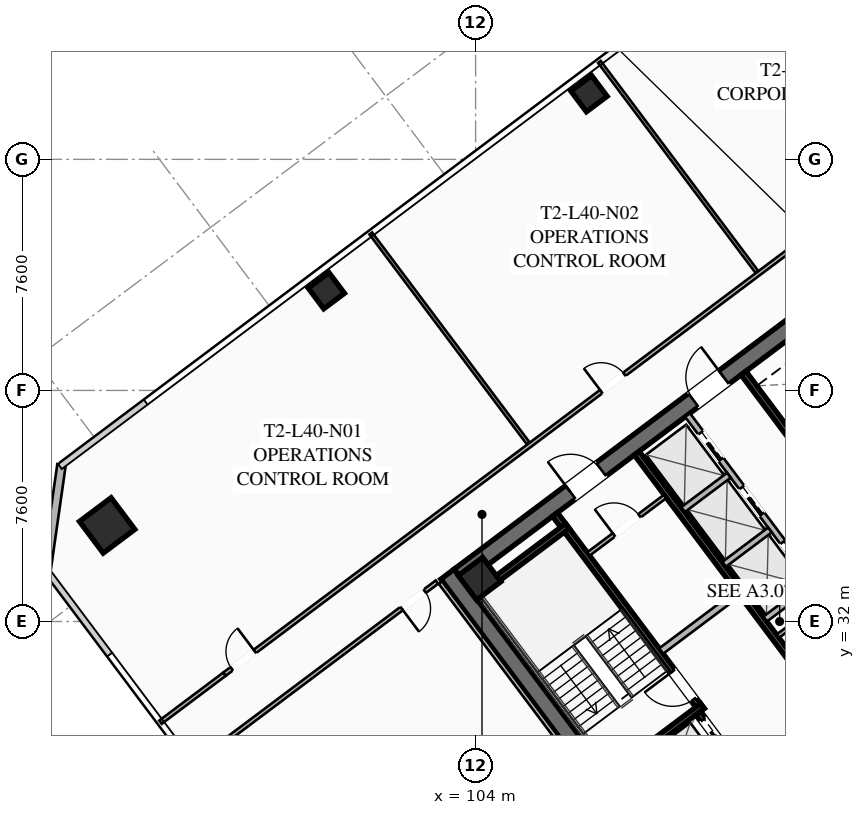
"""IFC4 building model, lengths in metres.
Left out: names, types, materials, properties, quantities, classifications, styles, units other than length and angle.
Written with IfcOpenShell. Run it as: python <this file> out.ifc"""

import sys

from ifc_helpers import new_model, si_unit, direction, frame, frame_2d, origin, origin_2d, place, context, subcontext, project, spatial, rectangle, hollow_rectangle, extrude, element, fill, save


model = new_model("IFC4")
c1 = context("Model", 3, precision=1e-05, world=origin(), true_north=direction((0.0, 1.0)))
c2 = subcontext(c1, "Body", "Model", "MODEL_VIEW")
j1 = project(units=[si_unit("LENGTHUNIT", "METRE"), si_unit("PLANEANGLEUNIT", "RADIAN")], contexts=[c1])
p1 = place(None, origin())
s1 = spatial("IfcSite", under=j1, at=p1, CompositionType="ELEMENT")
p2 = place(p1, origin())
s2 = spatial("IfcBuilding", under=s1, at=p2, CompositionType="ELEMENT")
p3 = place(p2, frame((0.0, 0.0, 149.9)))
s3 = spatial("IfcBuildingStorey", under=s2, at=p3, CompositionType="ELEMENT", Elevation=149.9)
p4 = place(p3, frame((112.436, 21.077, 0.0), z_axis=(0.0, 0.0, 1.0), x_axis=(-0.600005007985, 0.799996243986, 0.0)))
e1 = element("IfcWall", 1, at=p4, inside=s3, PredefinedType="SHEAR", context=c2, shape_type="SweptSolid", body=[
    extrude(rectangle(XDim=15.6, YDim=0.55, at=frame_2d((7.8, 0.0))), origin(), (0.0, 0.0, 1.0), 3.55),
])
p5 = place(p3, frame((124.539, 30.498, 0.0), z_axis=(0.0, 0.0, 1.0), x_axis=(-0.799998054672, -0.600002593761, 0.0)))
e2 = element("IfcWall", 2, at=p5, inside=s3, PredefinedType="SHEAR", context=c2, shape_type="SweptSolid", body=[
    extrude(rectangle(XDim=15.06, YDim=0.55, at=frame_2d((7.53, 0.0))), origin(), (0.0, 0.0, 1.0), 3.55),
])
p6 = place(p5, frame((9.23, 0.0, 0.0)))
e3 = element("IfcOpeningElement", 3, at=p6, cuts=e2, PredefinedType="OPENING", context=c2, shape_type="SweptSolid", body=[
    extrude(rectangle(XDim=1.25, YDim=2.25, at=frame_2d((0.625, 1.125))), frame((0.0, 0.285, 0.0), z_axis=(0.0, -1.0, 0.0), x_axis=(1.0, 0.0, 0.0)), (0.0, 0.0, 1.0), 0.57),
])
p7 = place(p5, frame((4.18, 0.0, 0.0)))
e4 = element("IfcOpeningElement", 4, at=p7, cuts=e2, PredefinedType="OPENING", context=c2, shape_type="SweptSolid", body=[
    extrude(rectangle(XDim=1.25, YDim=2.25, at=frame_2d((0.625, 1.125))), frame((0.0, 0.285, 0.0), z_axis=(0.0, -1.0, 0.0), x_axis=(1.0, 0.0, 0.0)), (0.0, 0.0, 1.0), 0.57),
])
p8 = place(p3, frame((103.461, 33.502, 0.0), z_axis=(0.0, 0.0, 1.0), x_axis=(0.799998054672, 0.600002593761, 0.0)))
e5 = element("IfcWall", 5, at=p8, inside=s3, PredefinedType="SHEAR", context=c2, shape_type="SweptSolid", body=[
    extrude(rectangle(XDim=15.06, YDim=0.55, at=frame_2d((7.53, 0.0))), origin(), (0.0, 0.0, 1.0), 3.55),
])
p9 = place(p8, frame((4.58, 0.0, 0.0)))
e6 = element("IfcOpeningElement", 6, at=p9, cuts=e5, PredefinedType="OPENING", context=c2, shape_type="SweptSolid", body=[
    extrude(rectangle(XDim=1.25, YDim=2.25, at=frame_2d((0.625, 1.125))), frame((0.0, 0.285, 0.0), z_axis=(0.0, -1.0, 0.0), x_axis=(1.0, 0.0, 0.0)), (0.0, 0.0, 1.0), 0.57),
])
p10 = place(p8, frame((9.63, 0.0, 0.0)))
e7 = element("IfcOpeningElement", 7, at=p10, cuts=e5, PredefinedType="OPENING", context=c2, shape_type="SweptSolid", body=[
    extrude(rectangle(XDim=1.25, YDim=2.25, at=frame_2d((0.625, 1.125))), frame((0.0, 0.285, 0.0), z_axis=(0.0, -1.0, 0.0), x_axis=(1.0, 0.0, 0.0)), (0.0, 0.0, 1.0), 0.57),
])
p11 = place(p3, frame((104.13, 33.41, 0.0), z_axis=(0.0, 0.0, 1.0), x_axis=(0.799999996291, 0.600000004945, 0.0)))
e8 = element("IfcColumn", 8, at=p11, inside=s3, PredefinedType="COLUMN", context=c2, shape_type="SweptSolid", body=[
    extrude(hollow_rectangle(XDim=1.0, YDim=1.0, WallThickness=0.04, at=origin_2d()), origin(), (0.0, 0.0, 1.0), 3.37),
])
p12 = place(p3, frame((91.88, 35.16, 0.0), z_axis=(0.0, 0.0, 1.0), x_axis=(0.799999996291, 0.600000004945, 0.0)))
e9 = element("IfcColumn", 9, at=p12, inside=s3, PredefinedType="COLUMN", context=c2, shape_type="SweptSolid", body=[
    extrude(hollow_rectangle(XDim=1.3, YDim=1.3, WallThickness=0.05, at=origin_2d()), origin(), (0.0, 0.0, 1.0), 3.37),
])
for number, where, z_axis, x_axis in (
    (10, (107.73, 49.36, 0.0), (0.0, 0.0, 1.0), (0.8, 0.6, 0.0)),
    (11, (99.09, 42.88, 0.0), (0.0, 0.0, 1.0), (0.8, 0.6, 0.0)),
):
    element("IfcColumn", number, at=place(p3, frame(where, z_axis=z_axis, x_axis=x_axis)), inside=s3, PredefinedType="COLUMN", context=c2, shape_type="SweptSolid", body=[
        extrude(hollow_rectangle(XDim=0.85, YDim=0.85, WallThickness=0.035, at=origin_2d()), origin(), (0.0, 0.0, 1.0), 3.37),
    ])
p13 = place(p3, frame((89.88, 33.66, 0.0), z_axis=(0.0, 0.0, 1.0), x_axis=(0.141421356237, 0.989949493661, 0.0)))
e12 = element("IfcWall", 12, at=p13, inside=s3, PredefinedType="SOLIDWALL", context=c2, shape_type="SweptSolid", body=[
    extrude(rectangle(XDim=3.536, YDim=0.28, at=frame_2d((1.768, 0.0))), origin(), (0.0, 0.0, 1.0), 3.37),
])
p14 = place(p3, frame((111.44, 29.08, 0.0), z_axis=(0.0, 0.0, 1.0), x_axis=(-0.59999029481, 0.8000072788, 0.0)))
e13 = element("IfcWall", 13, at=p14, inside=s3, PredefinedType="SHEAR", context=c2, shape_type="SweptSolid", body=[
    extrude(rectangle(XDim=8.05, YDim=0.2, at=frame_2d((4.025, 0.0))), origin(), (0.0, 0.0, 1.0), 3.37),
])
p15 = place(p14, frame((0.45, 0.0, 0.0)))
e14 = element("IfcOpeningElement", 14, at=p15, cuts=e13, PredefinedType="OPENING", context=c2, shape_type="SweptSolid", body=[
    extrude(rectangle(XDim=1.15, YDim=2.2, at=frame_2d((0.575, 1.1))), frame((0.0, 0.11, 0.0), z_axis=(0.0, -1.0, 0.0), x_axis=(1.0, 0.0, 0.0)), (0.0, 0.0, 1.0), 0.22),
])
for number, where, z_axis, x_axis in (
    (15, (108.396, 26.922, 0.0), (0.0, 0.0, 1.0), (0.8, 0.6, 0.0)),
    (16, (103.956, 32.842, 0.0), (0.0, 0.0, 1.0), (0.8, 0.6, 0.0)),
):
    element("IfcWall", number, at=place(p3, frame(where, z_axis=z_axis, x_axis=x_axis)), inside=s3, PredefinedType="SHEAR", context=c2, shape_type="SweptSolid", body=[
        extrude(rectangle(XDim=3.83, YDim=0.2, at=frame_2d((1.915, 0.0))), origin(), (0.0, 0.0, 1.0), 3.37),
    ])
p16 = place(p3, frame((117.998, 25.936, 0.0), z_axis=(0.0, 0.0, 1.0), x_axis=(-0.600002693989, 0.799997979501, 0.0)))
e17 = element("IfcWall", 17, at=p16, inside=s3, PredefinedType="SHEAR", context=c2, shape_type="SweptSolid", body=[
    extrude(rectangle(XDim=14.5, YDim=0.2, at=frame_2d((7.25, 0.0))), origin(), (0.0, 0.0, 1.0), 3.37),
])
p17 = place(p3, frame((110.104, 31.028, 0.0), z_axis=(0.0, 0.0, 1.0), x_axis=(0.800018601094, 0.59997519774, 0.0)))
e18 = element("IfcWall", 18, at=p17, inside=s3, PredefinedType="SOLIDWALL", context=c2, shape_type="SweptSolid", body=[
    extrude(rectangle(XDim=3.15, YDim=0.22, at=frame_2d((1.575, 0.0))), origin(), (0.0, 0.0, 1.0), 2.723),
])
p18 = place(p3, frame((115.19, 23.83, 0.0), z_axis=(0.0, 0.0, 1.0), x_axis=(-0.599993943644, 0.800004542231, 0.0)))
e19 = element("IfcWall", 19, at=p18, inside=s3, PredefinedType="SHEAR", context=c2, shape_type="SweptSolid", body=[
    extrude(rectangle(XDim=6.45, YDim=0.2, at=frame_2d((3.225, 0.0))), origin(), (0.0, 0.0, 1.0), 3.37),
])
p19 = place(p18, frame((4.875, 0.0, 0.0)))
e20 = element("IfcOpeningElement", 20, at=p19, cuts=e19, PredefinedType="OPENING", context=c2, shape_type="SweptSolid", body=[
    extrude(rectangle(XDim=1.3, YDim=2.25, at=frame_2d((0.65, 1.125))), frame((0.0, 0.11, 0.0), z_axis=(0.0, -1.0, 0.0), x_axis=(1.0, 0.0, 0.0)), (0.0, 0.0, 1.0), 0.22),
])
p20 = place(p18, frame((2.875, 0.0, 0.0)))
e21 = element("IfcOpeningElement", 21, at=p20, cuts=e19, PredefinedType="OPENING", context=c2, shape_type="SweptSolid", body=[
    extrude(rectangle(XDim=1.3, YDim=2.25, at=frame_2d((0.65, 1.125))), frame((0.0, 0.11, 0.0), z_axis=(0.0, -1.0, 0.0), x_axis=(1.0, 0.0, 0.0)), (0.0, 0.0, 1.0), 0.22),
])
p21 = place(p18, frame((0.675, 0.0, 0.0)))
e22 = element("IfcOpeningElement", 22, at=p21, cuts=e19, PredefinedType="OPENING", context=c2, shape_type="SweptSolid", body=[
    extrude(rectangle(XDim=1.3, YDim=2.25, at=frame_2d((0.65, 1.125))), frame((0.0, 0.11, 0.0), z_axis=(0.0, -1.0, 0.0), x_axis=(1.0, 0.0, 0.0)), (0.0, 0.0, 1.0), 0.22),
])
p22 = place(p3, frame((112.81, 40.17, 0.0), z_axis=(0.0, 0.0, 1.0), x_axis=(0.599993943644, -0.800004542231, 0.0)))
e23 = element("IfcWall", 23, at=p22, inside=s3, PredefinedType="SHEAR", context=c2, shape_type="SweptSolid", body=[
    extrude(rectangle(XDim=6.45, YDim=0.2, at=frame_2d((3.225, 0.0))), origin(), (0.0, 0.0, 1.0), 3.37),
])
p23 = place(p3, frame((107.71, 34.22, 0.0), z_axis=(0.0, 0.0, 1.0), x_axis=(0.799981399002, 0.60002480053, 0.0)))
e24 = element("IfcWall", 24, at=p23, inside=s3, PredefinedType="PARTITIONING", context=c2, shape_type="SweptSolid", body=[
    extrude(rectangle(XDim=3.15, YDim=0.135, at=frame_2d((1.575, 0.0))), origin(), (0.0, 0.0, 1.0), 2.723),
])
p24 = place(p23, frame((1.05, 0.0, 0.0)))
e25 = element("IfcOpeningElement", 25, at=p24, cuts=e24, PredefinedType="OPENING", context=c2, shape_type="SweptSolid", body=[
    extrude(rectangle(XDim=1.05, YDim=2.2, at=frame_2d((0.525, 1.1))), frame((0.0, 0.077, 0.0), z_axis=(0.0, -1.0, 0.0), x_axis=(1.0, 0.0, 0.0)), (0.0, 0.0, 1.0), 0.155),
])
p25 = place(p3, frame((113.946, 31.522, 0.0), z_axis=(0.0, 0.0, 1.0), x_axis=(0.8, 0.6, 0.0)))
e26 = element("IfcWall", 26, at=p25, inside=s3, PredefinedType="PARTITIONING", context=c2, shape_type="SweptSolid", body=[
    extrude(rectangle(XDim=1.88, YDim=0.135, at=frame_2d((0.94, 0.0))), origin(), (0.0, 0.0, 1.0), 2.723),
])
p26 = place(p3, frame((115.11, 33.27, 0.0), z_axis=(0.0, 0.0, 1.0), x_axis=(-0.600011322243, 0.799991508192, 0.0)))
e27 = element("IfcWall", 27, at=p26, inside=s3, PredefinedType="SOLIDWALL", context=c2, shape_type="SweptSolid", body=[
    extrude(rectangle(XDim=6.9, YDim=0.2, at=frame_2d((3.45, 0.0))), origin(), (0.0, 0.0, 1.0), 3.37),
])
p27 = place(p26, frame((0.575, 0.0, 0.0)))
e28 = element("IfcOpeningElement", 28, at=p27, cuts=e27, PredefinedType="OPENING", context=c2, shape_type="SweptSolid", body=[
    extrude(rectangle(XDim=1.1, YDim=2.2, at=frame_2d((0.55, 1.1))), frame((0.0, 0.11, 0.0), z_axis=(0.0, -1.0, 0.0), x_axis=(1.0, 0.0, 0.0)), (0.0, 0.0, 1.0), 0.22),
])
p28 = place(p26, frame((2.825, 0.0, 0.0)))
e29 = element("IfcOpeningElement", 29, at=p28, cuts=e27, PredefinedType="OPENING", context=c2, shape_type="SweptSolid", body=[
    extrude(rectangle(XDim=1.1, YDim=2.2, at=frame_2d((0.55, 1.1))), frame((0.0, 0.11, 0.0), z_axis=(0.0, -1.0, 0.0), x_axis=(1.0, 0.0, 0.0)), (0.0, 0.0, 1.0), 0.22),
])
p29 = place(p26, frame((5.075, 0.0, 0.0)))
e30 = element("IfcOpeningElement", 30, at=p29, cuts=e27, PredefinedType="OPENING", context=c2, shape_type="SweptSolid", body=[
    extrude(rectangle(XDim=1.1, YDim=2.2, at=frame_2d((0.55, 1.1))), frame((0.0, 0.11, 0.0), z_axis=(0.0, -1.0, 0.0), x_axis=(1.0, 0.0, 0.0)), (0.0, 0.0, 1.0), 0.22),
])
p30 = place(p3, frame((113.526, 32.082, 0.0), z_axis=(0.0, 0.0, 1.0), x_axis=(0.800046745961, 0.599937666993, 0.0)))
e31 = element("IfcWall", 31, at=p30, inside=s3, PredefinedType="SOLIDWALL", context=c2, shape_type="SweptSolid", body=[
    extrude(rectangle(XDim=1.88, YDim=0.2, at=frame_2d((0.94, 0.0))), origin(), (0.0, 0.0, 1.0), 3.37),
])
p31 = place(p3, frame((112.176, 33.882, 0.0), z_axis=(0.0, 0.0, 1.0), x_axis=(0.8, 0.6, 0.0)))
e32 = element("IfcWall", 32, at=p31, inside=s3, PredefinedType="SOLIDWALL", context=c2, shape_type="SweptSolid", body=[
    extrude(rectangle(XDim=1.88, YDim=0.2, at=frame_2d((0.94, 0.0))), origin(), (0.0, 0.0, 1.0), 3.37),
])
p32 = place(p3, frame((110.826, 35.682, 0.0), z_axis=(0.0, 0.0, 1.0), x_axis=(0.799984418148, 0.600020775241, 0.0)))
e33 = element("IfcWall", 33, at=p32, inside=s3, PredefinedType="SOLIDWALL", context=c2, shape_type="SweptSolid", body=[
    extrude(rectangle(XDim=1.88, YDim=0.2, at=frame_2d((0.94, 0.0))), origin(), (0.0, 0.0, 1.0), 3.37),
])
p33 = place(p3, frame((95.738, 30.266, 0.0), z_axis=(0.0, 0.0, 1.0), x_axis=(0.800003744006, 0.59999500796, 0.0)))
e34 = element("IfcWall", 34, at=p33, inside=s3, PredefinedType="PARTITIONING", context=c2, shape_type="SweptSolid", body=[
    extrude(rectangle(XDim=31.3, YDim=0.135, at=frame_2d((15.65, 0.0))), origin(), (0.0, 0.0, 1.0), 2.723),
])
p34 = place(p33, frame((0.3, 0.0, 0.0)))
e35 = element("IfcOpeningElement", 35, at=p34, cuts=e34, PredefinedType="OPENING", context=c2, shape_type="SweptSolid", body=[
    extrude(rectangle(XDim=0.95, YDim=2.05, at=frame_2d((0.475, 1.025))), frame((0.0, 0.077, 0.0), z_axis=(0.0, -1.0, 0.0), x_axis=(1.0, 0.0, 0.0)), (0.0, 0.0, 1.0), 0.155),
])
p35 = place(p33, frame((15.493, 0.0, 0.0)))
e36 = element("IfcOpeningElement", 36, at=p35, cuts=e34, PredefinedType="OPENING", context=c2, shape_type="SweptSolid", body=[
    extrude(rectangle(XDim=0.95, YDim=2.05, at=frame_2d((0.475, 1.025))), frame((0.0, 0.077, 0.0), z_axis=(0.0, -1.0, 0.0), x_axis=(1.0, 0.0, 0.0)), (0.0, 0.0, 1.0), 0.155),
])
p36 = place(p33, frame((30.05, 0.0, 0.0)))
e37 = element("IfcOpeningElement", 37, at=p36, cuts=e34, PredefinedType="OPENING", context=c2, shape_type="SweptSolid", body=[
    extrude(rectangle(XDim=0.95, YDim=2.05, at=frame_2d((0.475, 1.025))), frame((0.0, 0.077, 0.0), z_axis=(0.0, -1.0, 0.0), x_axis=(1.0, 0.0, 0.0)), (0.0, 0.0, 1.0), 0.155),
])
p37 = place(p3, frame((93.634, 28.688, 0.0), z_axis=(0.0, 0.0, 1.0), x_axis=(0.799977721118, 0.600029704027, 0.0)))
e38 = element("IfcWall", 38, at=p37, inside=s3, PredefinedType="PARTITIONING", context=c2, shape_type="SweptSolid", body=[
    extrude(rectangle(XDim=2.63, YDim=0.135, at=frame_2d((1.315, 0.0))), origin(), (0.0, 0.0, 1.0), 2.723),
])
p38 = place(p3, frame((105.73, 37.86, 0.0), z_axis=(0.0, 0.0, 1.0), x_axis=(-0.600009052859, 0.799993210276, 0.0)))
e39 = element("IfcWall", 39, at=p38, inside=s3, PredefinedType="PARTITIONING", context=c2, shape_type="SweptSolid", body=[
    extrude(rectangle(XDim=8.63, YDim=0.11, at=frame_2d((4.315, 0.0))), origin(), (0.0, 0.0, 1.0), 2.723),
])
p39 = place(p3, frame((113.25, 43.5, 0.0), z_axis=(0.0, 0.0, 1.0), x_axis=(-0.599995473644, 0.800003394747, 0.0)))
e40 = element("IfcWall", 40, at=p39, inside=s3, PredefinedType="PARTITIONING", context=c2, shape_type="SweptSolid", body=[
    extrude(rectangle(XDim=8.63, YDim=0.11, at=frame_2d((4.315, 0.0))), origin(), (0.0, 0.0, 1.0), 2.723),
])
p40 = place(p3, frame((133.09, 32.63, 0.0), z_axis=(0.0, 0.0, 1.0), x_axis=(-0.800003744006, -0.59999500796, 0.0)))
e41 = element("IfcWall", 41, at=p40, inside=s3, PredefinedType="PARTITIONING", context=c2, shape_type="SweptSolid", body=[
    extrude(rectangle(XDim=31.3, YDim=0.135, at=frame_2d((15.65, 0.0))), origin(), (0.0, 0.0, 1.0), 2.723),
])
p41 = place(p40, frame((29.97, 0.0, 0.0)))
e42 = element("IfcOpeningElement", 42, at=p41, cuts=e41, PredefinedType="OPENING", context=c2, shape_type="SweptSolid", body=[
    extrude(rectangle(XDim=0.95, YDim=2.05, at=frame_2d((0.475, 1.025))), frame((0.0, 0.077, 0.0), z_axis=(0.0, -1.0, 0.0), x_axis=(1.0, 0.0, 0.0)), (0.0, 0.0, 1.0), 0.155),
])
p42 = place(p40, frame((18.914, 0.0, 0.0)))
e43 = element("IfcOpeningElement", 43, at=p42, cuts=e41, PredefinedType="OPENING", context=c2, shape_type="SweptSolid", body=[
    extrude(rectangle(XDim=0.95, YDim=2.05, at=frame_2d((0.475, 1.025))), frame((0.0, 0.077, 0.0), z_axis=(0.0, -1.0, 0.0), x_axis=(1.0, 0.0, 0.0)), (0.0, 0.0, 1.0), 0.155),
])
p43 = place(p40, frame((0.38, 0.0, 0.0)))
e44 = element("IfcOpeningElement", 44, at=p43, cuts=e41, PredefinedType="OPENING", context=c2, shape_type="SweptSolid", body=[
    extrude(rectangle(XDim=0.95, YDim=2.05, at=frame_2d((0.475, 1.025))), frame((0.0, 0.077, 0.0), z_axis=(0.0, -1.0, 0.0), x_axis=(1.0, 0.0, 0.0)), (0.0, 0.0, 1.0), 0.155),
])
p44 = place(p3, frame((112.104, 20.928, 0.0), z_axis=(0.0, 0.0, 1.0), x_axis=(-0.599994940075, 0.800003794918, 0.0)))
e45 = element("IfcWall", 45, at=p44, inside=s3, PredefinedType="PARTITIONING", context=c2, shape_type="SweptSolid", body=[
    extrude(rectangle(XDim=15.44, YDim=0.135, at=frame_2d((7.72, 0.0))), origin(), (0.0, 0.0, 1.0), 2.723),
])
p45 = place(p3, frame((102.728, 33.296, 0.0), z_axis=(0.0, 0.0, 1.0), x_axis=(-0.800002918023, -0.599996109283, 0.0)))
e46 = element("IfcWall", 46, at=p45, inside=s3, PredefinedType="PARTITIONING", context=c2, shape_type="SweptSolid", body=[
    extrude(rectangle(XDim=10.04, YDim=0.135, at=frame_2d((5.02, 0.0))), origin(), (0.0, 0.0, 1.0), 2.723),
])
p46 = place(p45, frame((0.5, 0.0, 0.0)))
e47 = element("IfcOpeningElement", 47, at=p46, cuts=e46, PredefinedType="OPENING", context=c2, shape_type="SweptSolid", body=[
    extrude(rectangle(XDim=0.95, YDim=2.05, at=frame_2d((0.475, 1.025))), frame((0.0, 0.077, 0.0), z_axis=(0.0, -1.0, 0.0), x_axis=(1.0, 0.0, 0.0)), (0.0, 0.0, 1.0), 0.155),
])
p47 = place(p9, origin())
e48 = element("IfcDoor", 48, at=p47, inside=s3, OperationType="SINGLE_SWING_LEFT", PredefinedType="DOOR", context=c2, shape_type="SweptSolid", body=[
    extrude(rectangle(XDim=1.25, YDim=2.25, at=frame_2d((0.625, 1.125))), frame((0.0, 0.025, 0.0), z_axis=(0.0, -1.0, 0.0), x_axis=(1.0, 0.0, 0.0)), (0.0, 0.0, 1.0), 0.05),
])
fill(e6, e48)
p48 = place(p10, origin())
e49 = element("IfcDoor", 49, at=p48, inside=s3, OperationType="SINGLE_SWING_RIGHT", PredefinedType="DOOR", context=c2, shape_type="SweptSolid", body=[
    extrude(rectangle(XDim=1.25, YDim=2.25, at=frame_2d((0.625, 1.125))), frame((0.0, 0.025, 0.0), z_axis=(0.0, -1.0, 0.0), x_axis=(1.0, 0.0, 0.0)), (0.0, 0.0, 1.0), 0.05),
])
fill(e7, e49)
p49 = place(p15, origin())
e50 = element("IfcDoor", 50, at=p49, inside=s3, OperationType="SINGLE_SWING_RIGHT", PredefinedType="DOOR", context=c2, shape_type="SweptSolid", body=[
    extrude(rectangle(XDim=1.15, YDim=2.2, at=frame_2d((0.575, 1.1))), frame((0.0, 0.025, 0.0), z_axis=(0.0, -1.0, 0.0), x_axis=(1.0, 0.0, 0.0)), (0.0, 0.0, 1.0), 0.05),
])
fill(e14, e50)
p50 = place(p24, origin())
e51 = element("IfcDoor", 51, at=p50, inside=s3, OperationType="SINGLE_SWING_LEFT", PredefinedType="DOOR", context=c2, shape_type="SweptSolid", body=[
    extrude(rectangle(XDim=1.05, YDim=2.2, at=frame_2d((0.525, 1.1))), frame((0.0, 0.025, 0.0), z_axis=(0.0, -1.0, 0.0), x_axis=(1.0, 0.0, 0.0)), (0.0, 0.0, 1.0), 0.05),
])
fill(e25, e51)
p51 = place(p34, origin())
e52 = element("IfcDoor", 52, at=p51, inside=s3, OperationType="SINGLE_SWING_RIGHT", PredefinedType="DOOR", context=c2, shape_type="SweptSolid", body=[
    extrude(rectangle(XDim=0.95, YDim=2.05, at=frame_2d((0.475, 1.025))), frame((0.0, 0.025, 0.0), z_axis=(0.0, -1.0, 0.0), x_axis=(1.0, 0.0, 0.0)), (0.0, 0.0, 1.0), 0.05),
])
fill(e35, e52)
p52 = place(p35, origin())
e53 = element("IfcDoor", 53, at=p52, inside=s3, OperationType="SINGLE_SWING_LEFT", PredefinedType="DOOR", context=c2, shape_type="SweptSolid", body=[
    extrude(rectangle(XDim=0.95, YDim=2.05, at=frame_2d((0.475, 1.025))), frame((0.0, 0.025, 0.0), z_axis=(0.0, -1.0, 0.0), x_axis=(1.0, 0.0, 0.0)), (0.0, 0.0, 1.0), 0.05),
])
fill(e36, e53)
p53 = place(p46, origin())
e54 = element("IfcDoor", 54, at=p53, inside=s3, OperationType="SINGLE_SWING_RIGHT", PredefinedType="DOOR", context=c2, shape_type="SweptSolid", body=[
    extrude(rectangle(XDim=0.95, YDim=2.05, at=frame_2d((0.475, 1.025))), frame((0.0, 0.025, 0.0), z_axis=(0.0, -1.0, 0.0), x_axis=(1.0, 0.0, 0.0)), (0.0, 0.0, 1.0), 0.05),
])
fill(e47, e54)
p54 = place(p19, origin())
e55 = element("IfcDoor", 55, at=p54, inside=s3, OperationType="SLIDING_TO_LEFT", PredefinedType="DOOR", context=c2, shape_type="SweptSolid", body=[
    extrude(rectangle(XDim=1.3, YDim=2.25, at=frame_2d((0.65, 1.125))), frame((0.0, 0.025, 0.0), z_axis=(0.0, -1.0, 0.0), x_axis=(1.0, 0.0, 0.0)), (0.0, 0.0, 1.0), 0.05),
])
fill(e20, e55)
p55 = place(p27, origin())
e56 = element("IfcDoor", 56, at=p55, inside=s3, OperationType="SLIDING_TO_LEFT", PredefinedType="DOOR", context=c2, shape_type="SweptSolid", body=[
    extrude(rectangle(XDim=1.1, YDim=2.2, at=frame_2d((0.55, 1.1))), frame((0.0, 0.025, 0.0), z_axis=(0.0, -1.0, 0.0), x_axis=(1.0, 0.0, 0.0)), (0.0, 0.0, 1.0), 0.05),
])
fill(e28, e56)
p56 = place(p28, origin())
e57 = element("IfcDoor", 57, at=p56, inside=s3, OperationType="SLIDING_TO_LEFT", PredefinedType="DOOR", context=c2, shape_type="SweptSolid", body=[
    extrude(rectangle(XDim=1.1, YDim=2.2, at=frame_2d((0.55, 1.1))), frame((0.0, 0.025, 0.0), z_axis=(0.0, -1.0, 0.0), x_axis=(1.0, 0.0, 0.0)), (0.0, 0.0, 1.0), 0.05),
])
fill(e29, e57)
p57 = place(p29, origin())
e58 = element("IfcDoor", 58, at=p57, inside=s3, OperationType="SLIDING_TO_LEFT", PredefinedType="DOOR", context=c2, shape_type="SweptSolid", body=[
    extrude(rectangle(XDim=1.1, YDim=2.2, at=frame_2d((0.55, 1.1))), frame((0.0, 0.025, 0.0), z_axis=(0.0, -1.0, 0.0), x_axis=(1.0, 0.0, 0.0)), (0.0, 0.0, 1.0), 0.05),
])
fill(e30, e58)
save(model, sys.argv[1])
